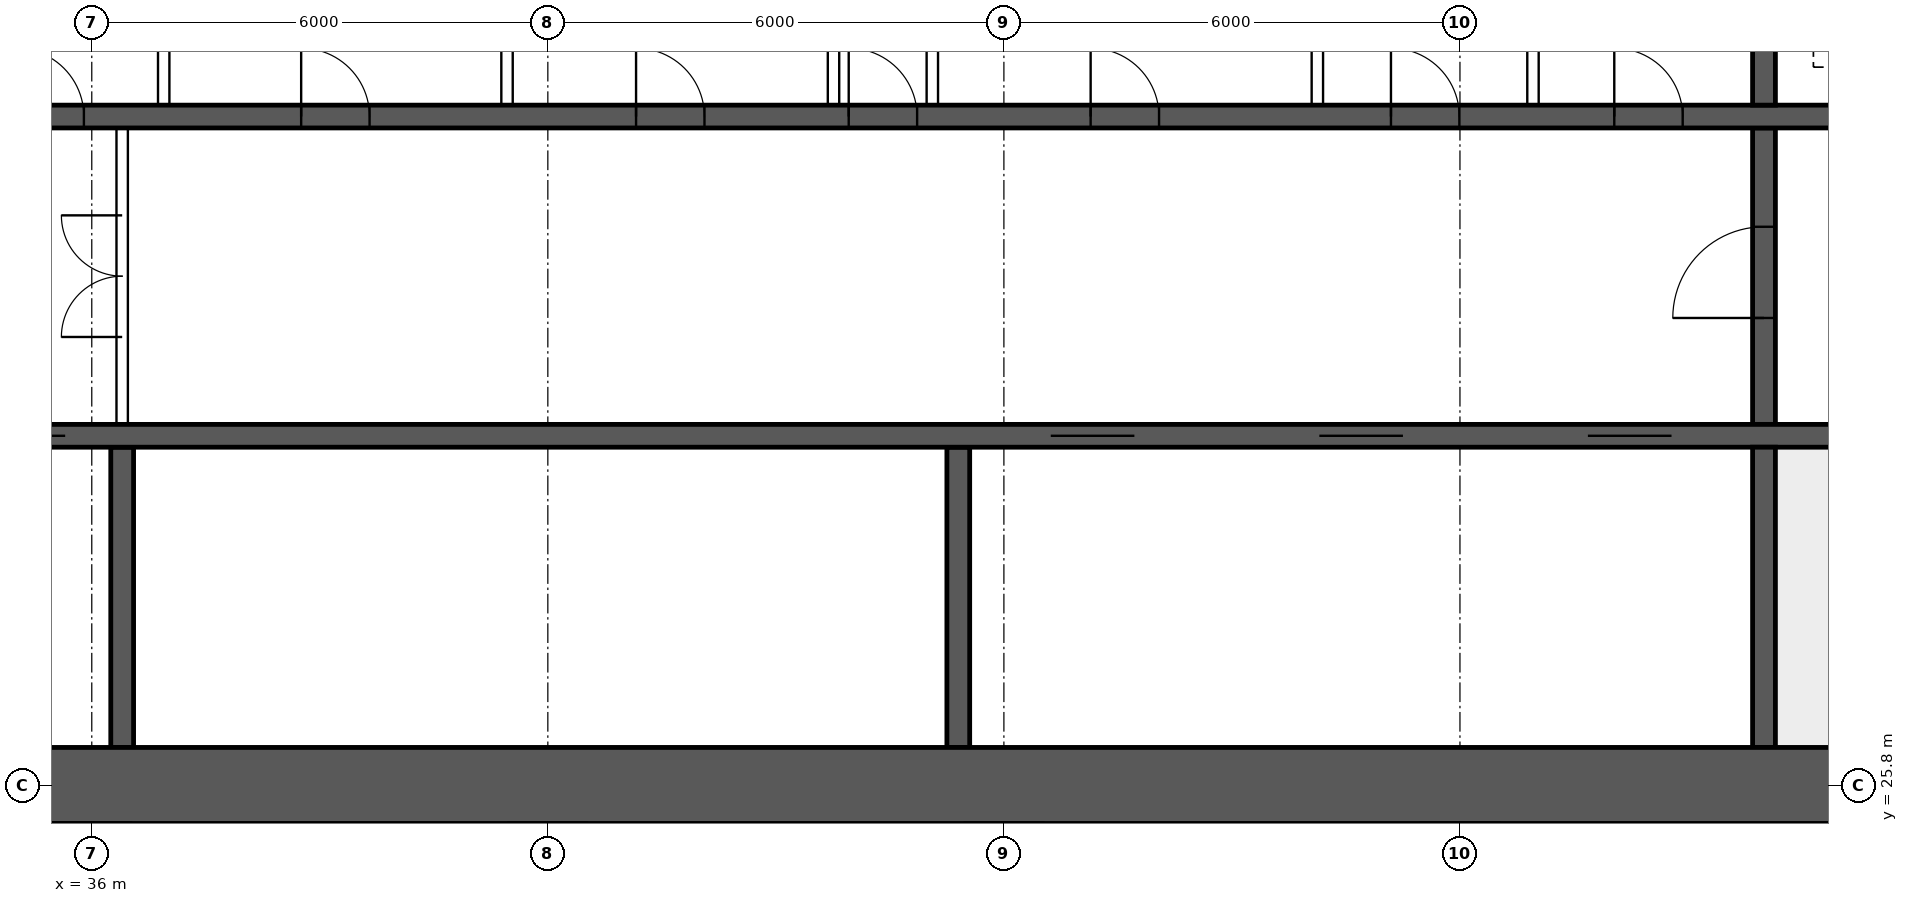
"""IFC4 building model, lengths in metres.
Left out: names, types, materials, properties, quantities, classifications, styles, units other than length and angle.
Written with IfcOpenShell. Run it as: python <this file> out.ifc"""

import sys

from ifc_helpers import new_model, si_unit, direction, frame, frame_2d, origin, place, context, subcontext, project, spatial, rectangle, extrude, element, fill, save


model = new_model("IFC4")
c1 = context("Model", 3, precision=1e-05, world=origin(), true_north=direction((0.0, 1.0)))
c2 = subcontext(c1, "Body", "Model", "MODEL_VIEW")
j1 = project(units=[si_unit("LENGTHUNIT", "METRE"), si_unit("PLANEANGLEUNIT", "RADIAN")], contexts=[c1])
p1 = place(None, origin())
s1 = spatial("IfcSite", under=j1, at=p1, CompositionType="ELEMENT")
p2 = place(p1, origin())
s2 = spatial("IfcBuilding", under=s1, at=p2, CompositionType="ELEMENT")
p3 = place(p2, frame((0.0, 0.0, 46.45)))
s3 = spatial("IfcBuildingStorey", under=s2, at=p3, CompositionType="ELEMENT", Elevation=46.45)
p4 = place(p3, frame((18.0, 25.8, 0.0), z_axis=(0.0, 0.0, 1.0), x_axis=(1.0, 0.0, 0.0)))
e1 = element("IfcWall", 1, at=p4, inside=s3, PredefinedType="SHEAR", context=c2, shape_type="SweptSolid", body=[
    extrude(rectangle(XDim=48.0, YDim=1.0, at=frame_2d((24.0, 0.0))), origin(), (0.0, 0.0, 1.0), 3.75),
])
p5 = place(p3, frame((18.5, 30.4, 0.0), z_axis=(0.0, 0.0, 1.0), x_axis=(1.0, 0.0, 0.0)))
e2 = element("IfcWall", 2, at=p5, inside=s3, PredefinedType="SHEAR", context=c2, shape_type="SweptSolid", body=[
    extrude(rectangle(XDim=47.0, YDim=0.3, at=frame_2d((23.5, 0.0))), origin(), (0.0, 0.0, 1.0), 3.75),
])
p6 = place(p5, frame((0.4, 0.0, 0.0)))
e3 = element("IfcOpeningElement", 3, at=p6, cuts=e2, PredefinedType="OPENING", context=c2, shape_type="SweptSolid", body=[
    extrude(rectangle(XDim=1.0, YDim=2.1, at=frame_2d((0.5, 1.05))), frame((0.0, 0.16, 0.0), z_axis=(0.0, -1.0, 0.0), x_axis=(1.0, 0.0, 0.0)), (0.0, 0.0, 1.0), 0.32),
])
p7 = place(p5, frame((45.6, 0.0, 0.0)))
e4 = element("IfcOpeningElement", 4, at=p7, cuts=e2, PredefinedType="OPENING", context=c2, shape_type="SweptSolid", body=[
    extrude(rectangle(XDim=1.0, YDim=2.1, at=frame_2d((0.5, 1.05))), frame((0.0, 0.16, 0.0), z_axis=(0.0, -1.0, 0.0), x_axis=(1.0, 0.0, 0.0)), (0.0, 0.0, 1.0), 0.32),
])
p8 = place(p5, frame((8.25, 0.0, 0.0)))
e5 = element("IfcOpeningElement", 5, at=p8, cuts=e2, PredefinedType="OPENING", context=c2, shape_type="SweptSolid", body=[
    extrude(rectangle(XDim=1.1, YDim=2.1, at=frame_2d((0.55, 1.05))), frame((0.0, 0.16, 0.0), z_axis=(0.0, -1.0, 0.0), x_axis=(1.0, 0.0, 0.0)), (0.0, 0.0, 1.0), 0.32),
])
p9 = place(p5, frame((10.85, 0.0, 0.0)))
e6 = element("IfcOpeningElement", 6, at=p9, cuts=e2, PredefinedType="OPENING", context=c2, shape_type="SweptSolid", body=[
    extrude(rectangle(XDim=1.1, YDim=2.1, at=frame_2d((0.55, 1.05))), frame((0.0, 0.16, 0.0), z_axis=(0.0, -1.0, 0.0), x_axis=(1.0, 0.0, 0.0)), (0.0, 0.0, 1.0), 0.32),
])
p10 = place(p5, frame((13.45, 0.0, 0.0)))
e7 = element("IfcOpeningElement", 7, at=p10, cuts=e2, PredefinedType="OPENING", context=c2, shape_type="SweptSolid", body=[
    extrude(rectangle(XDim=1.1, YDim=2.1, at=frame_2d((0.55, 1.05))), frame((0.0, 0.16, 0.0), z_axis=(0.0, -1.0, 0.0), x_axis=(1.0, 0.0, 0.0)), (0.0, 0.0, 1.0), 0.32),
])
p11 = place(p5, frame((16.05, 0.0, 0.0)))
e8 = element("IfcOpeningElement", 8, at=p11, cuts=e2, PredefinedType="OPENING", context=c2, shape_type="SweptSolid", body=[
    extrude(rectangle(XDim=1.1, YDim=2.1, at=frame_2d((0.55, 1.05))), frame((0.0, 0.16, 0.0), z_axis=(0.0, -1.0, 0.0), x_axis=(1.0, 0.0, 0.0)), (0.0, 0.0, 1.0), 0.32),
])
p12 = place(p5, frame((30.117, 0.0, 0.0)))
e9 = element("IfcOpeningElement", 9, at=p12, cuts=e2, PredefinedType="OPENING", context=c2, shape_type="SweptSolid", body=[
    extrude(rectangle(XDim=1.1, YDim=2.1, at=frame_2d((0.55, 1.05))), frame((0.0, 0.16, 0.0), z_axis=(0.0, -1.0, 0.0), x_axis=(1.0, 0.0, 0.0)), (0.0, 0.0, 1.0), 0.32),
])
p13 = place(p5, frame((33.65, 0.0, 0.0)))
e10 = element("IfcOpeningElement", 10, at=p13, cuts=e2, PredefinedType="OPENING", context=c2, shape_type="SweptSolid", body=[
    extrude(rectangle(XDim=1.1, YDim=2.1, at=frame_2d((0.55, 1.05))), frame((0.0, 0.16, 0.0), z_axis=(0.0, -1.0, 0.0), x_axis=(1.0, 0.0, 0.0)), (0.0, 0.0, 1.0), 0.32),
])
p14 = place(p5, frame((37.183, 0.0, 0.0)))
e11 = element("IfcOpeningElement", 11, at=p14, cuts=e2, PredefinedType="OPENING", context=c2, shape_type="SweptSolid", body=[
    extrude(rectangle(XDim=1.1, YDim=2.1, at=frame_2d((0.55, 1.05))), frame((0.0, 0.16, 0.0), z_axis=(0.0, -1.0, 0.0), x_axis=(1.0, 0.0, 0.0)), (0.0, 0.0, 1.0), 0.32),
])
p15 = place(p3, frame((18.5, 34.6, 0.0), z_axis=(0.0, 0.0, 1.0), x_axis=(1.0, 0.0, 0.0)))
e12 = element("IfcWall", 12, at=p15, inside=s3, PredefinedType="SHEAR", context=c2, shape_type="SweptSolid", body=[
    extrude(rectangle(XDim=47.0, YDim=0.3, at=frame_2d((23.5, 0.0))), origin(), (0.0, 0.0, 1.0), 3.75),
])
p16 = place(p15, frame((0.9, 0.0, 0.0)))
e13 = element("IfcOpeningElement", 13, at=p16, cuts=e12, PredefinedType="OPENING", context=c2, shape_type="SweptSolid", body=[
    extrude(rectangle(XDim=1.1, YDim=2.1, at=frame_2d((0.55, 1.05))), frame((0.0, 0.16, 0.0), z_axis=(0.0, -1.0, 0.0), x_axis=(1.0, 0.0, 0.0)), (0.0, 0.0, 1.0), 0.32),
])
p17 = place(p15, frame((45.0, 0.0, 0.0)))
e14 = element("IfcOpeningElement", 14, at=p17, cuts=e12, PredefinedType="OPENING", context=c2, shape_type="SweptSolid", body=[
    extrude(rectangle(XDim=1.1, YDim=2.1, at=frame_2d((0.55, 1.05))), frame((0.0, 0.16, 0.0), z_axis=(0.0, -1.0, 0.0), x_axis=(1.0, 0.0, 0.0)), (0.0, 0.0, 1.0), 0.32),
])
p18 = place(p15, frame((4.1, 0.0, 0.0)))
e15 = element("IfcOpeningElement", 15, at=p18, cuts=e12, PredefinedType="OPENING", context=c2, shape_type="SweptSolid", body=[
    extrude(rectangle(XDim=0.9, YDim=2.1, at=frame_2d((0.45, 1.05))), frame((0.0, 0.16, 0.0), z_axis=(0.0, -1.0, 0.0), x_axis=(1.0, 0.0, 0.0)), (0.0, 0.0, 1.0), 0.32),
])
p19 = place(p15, frame((42.0, 0.0, 0.0)))
e16 = element("IfcOpeningElement", 16, at=p19, cuts=e12, PredefinedType="OPENING", context=c2, shape_type="SweptSolid", body=[
    extrude(rectangle(XDim=0.9, YDim=2.1, at=frame_2d((0.45, 1.05))), frame((0.0, 0.16, 0.0), z_axis=(0.0, -1.0, 0.0), x_axis=(1.0, 0.0, 0.0)), (0.0, 0.0, 1.0), 0.32),
])
p20 = place(p15, frame((8.875, 0.0, 0.0)))
e17 = element("IfcOpeningElement", 17, at=p20, cuts=e12, PredefinedType="OPENING", context=c2, shape_type="SweptSolid", body=[
    extrude(rectangle(XDim=0.9, YDim=2.1, at=frame_2d((0.45, 1.05))), frame((0.0, 0.16, 0.0), z_axis=(0.0, -1.0, 0.0), x_axis=(1.0, 0.0, 0.0)), (0.0, 0.0, 1.0), 0.32),
])
p21 = place(p15, frame((12.849, 0.0, 0.0)))
e18 = element("IfcOpeningElement", 18, at=p21, cuts=e12, PredefinedType="OPENING", context=c2, shape_type="SweptSolid", body=[
    extrude(rectangle(XDim=0.9, YDim=2.1, at=frame_2d((0.45, 1.05))), frame((0.0, 0.16, 0.0), z_axis=(0.0, -1.0, 0.0), x_axis=(1.0, 0.0, 0.0)), (0.0, 0.0, 1.0), 0.32),
])
p22 = place(p15, frame((16.496, 0.0, 0.0)))
e19 = element("IfcOpeningElement", 19, at=p22, cuts=e12, PredefinedType="OPENING", context=c2, shape_type="SweptSolid", body=[
    extrude(rectangle(XDim=0.9, YDim=2.1, at=frame_2d((0.45, 1.05))), frame((0.0, 0.16, 0.0), z_axis=(0.0, -1.0, 0.0), x_axis=(1.0, 0.0, 0.0)), (0.0, 0.0, 1.0), 0.32),
])
p23 = place(p15, frame((20.255, 0.0, 0.0)))
e20 = element("IfcOpeningElement", 20, at=p23, cuts=e12, PredefinedType="OPENING", context=c2, shape_type="SweptSolid", body=[
    extrude(rectangle(XDim=0.9, YDim=2.1, at=frame_2d((0.45, 1.05))), frame((0.0, 0.16, 0.0), z_axis=(0.0, -1.0, 0.0), x_axis=(1.0, 0.0, 0.0)), (0.0, 0.0, 1.0), 0.32),
])
p24 = place(p15, frame((24.661, 0.0, 0.0)))
e21 = element("IfcOpeningElement", 21, at=p24, cuts=e12, PredefinedType="OPENING", context=c2, shape_type="SweptSolid", body=[
    extrude(rectangle(XDim=0.9, YDim=2.1, at=frame_2d((0.45, 1.05))), frame((0.0, 0.16, 0.0), z_axis=(0.0, -1.0, 0.0), x_axis=(1.0, 0.0, 0.0)), (0.0, 0.0, 1.0), 0.32),
])
p25 = place(p15, frame((27.458, 0.0, 0.0)))
e22 = element("IfcOpeningElement", 22, at=p25, cuts=e12, PredefinedType="OPENING", context=c2, shape_type="SweptSolid", body=[
    extrude(rectangle(XDim=0.9, YDim=2.1, at=frame_2d((0.45, 1.05))), frame((0.0, 0.16, 0.0), z_axis=(0.0, -1.0, 0.0), x_axis=(1.0, 0.0, 0.0)), (0.0, 0.0, 1.0), 0.32),
])
p26 = place(p15, frame((30.641, 0.0, 0.0)))
e23 = element("IfcOpeningElement", 23, at=p26, cuts=e12, PredefinedType="OPENING", context=c2, shape_type="SweptSolid", body=[
    extrude(rectangle(XDim=0.9, YDim=2.1, at=frame_2d((0.45, 1.05))), frame((0.0, 0.16, 0.0), z_axis=(0.0, -1.0, 0.0), x_axis=(1.0, 0.0, 0.0)), (0.0, 0.0, 1.0), 0.32),
])
p27 = place(p15, frame((34.592, 0.0, 0.0)))
e24 = element("IfcOpeningElement", 24, at=p27, cuts=e12, PredefinedType="OPENING", context=c2, shape_type="SweptSolid", body=[
    extrude(rectangle(XDim=0.9, YDim=2.1, at=frame_2d((0.45, 1.05))), frame((0.0, 0.16, 0.0), z_axis=(0.0, -1.0, 0.0), x_axis=(1.0, 0.0, 0.0)), (0.0, 0.0, 1.0), 0.32),
])
p28 = place(p15, frame((37.53, 0.0, 0.0)))
e25 = element("IfcOpeningElement", 25, at=p28, cuts=e12, PredefinedType="OPENING", context=c2, shape_type="SweptSolid", body=[
    extrude(rectangle(XDim=0.9, YDim=2.1, at=frame_2d((0.45, 1.05))), frame((0.0, 0.16, 0.0), z_axis=(0.0, -1.0, 0.0), x_axis=(1.0, 0.0, 0.0)), (0.0, 0.0, 1.0), 0.32),
])
p29 = place(p3, frame((58.0, 26.3, 0.0), z_axis=(0.0, 0.0, 1.0), x_axis=(0.0, 1.0, 0.0)))
e26 = element("IfcWall", 26, at=p29, inside=s3, PredefinedType="SHEAR", context=c2, shape_type="SweptSolid", body=[
    extrude(rectangle(XDim=3.95, YDim=0.3, at=frame_2d((1.975, 0.0))), origin(), (0.0, 0.0, 1.0), 3.75),
])
p30 = place(p3, frame((58.0, 30.55, 0.0), z_axis=(0.0, 0.0, 1.0), x_axis=(0.0, 1.0, 0.0)))
e27 = element("IfcWall", 27, at=p30, inside=s3, PredefinedType="SHEAR", context=c2, shape_type="SweptSolid", body=[
    extrude(rectangle(XDim=3.9, YDim=0.3, at=frame_2d((1.95, 0.0))), origin(), (0.0, 0.0, 1.0), 3.75),
])
p31 = place(p30, frame((1.4, 0.0, 0.0)))
e28 = element("IfcOpeningElement", 28, at=p31, cuts=e27, PredefinedType="OPENING", context=c2, shape_type="SweptSolid", body=[
    extrude(rectangle(XDim=1.2, YDim=2.1, at=frame_2d((0.6, 1.05))), frame((0.0, 0.16, 0.0), z_axis=(0.0, -1.0, 0.0), x_axis=(1.0, 0.0, 0.0)), (0.0, 0.0, 1.0), 0.32),
])
p32 = place(p3, frame((58.0, 34.75, 0.0), z_axis=(0.0, 0.0, 1.0), x_axis=(0.0, 1.0, 0.0)))
e29 = element("IfcWall", 29, at=p32, inside=s3, PredefinedType="SHEAR", context=c2, shape_type="SweptSolid", body=[
    extrude(rectangle(XDim=2.95, YDim=0.3, at=frame_2d((1.475, 0.0))), origin(), (0.0, 0.0, 1.0), 3.75),
])
for number, where, z_axis, x_axis in (
    (30, (36.4, 26.3, 0.0), (0.0, 0.0, 1.0), (0.0, 1.0, 0.0)),
    (31, (47.4, 26.3, 0.0), (0.0, 0.0, 1.0), (0.0, 1.0, 0.0)),
):
    element("IfcWall", number, at=place(p3, frame(where, z_axis=z_axis, x_axis=x_axis)), inside=s3, PredefinedType="SHEAR", context=c2, shape_type="SweptSolid", body=[
        extrude(rectangle(XDim=3.95, YDim=0.3, at=frame_2d((1.975, 0.0))), origin(), (0.0, 0.0, 1.0), 3.75),
    ])
p33 = place(p3, frame((36.4, 30.55, 0.0), z_axis=(0.0, 0.0, 1.0), x_axis=(0.0, 1.0, 0.0)))
e32 = element("IfcWall", 32, at=p33, inside=s3, PredefinedType="SOLIDWALL", context=c2, shape_type="SweptSolid", body=[
    extrude(rectangle(XDim=3.9, YDim=0.15, at=frame_2d((1.95, 0.0))), origin(), (0.0, 0.0, 1.0), 3.5),
])
p34 = place(p33, frame((1.15, 0.0, 0.0)))
e33 = element("IfcOpeningElement", 33, at=p34, cuts=e32, PredefinedType="OPENING", context=c2, shape_type="SweptSolid", body=[
    extrude(rectangle(XDim=1.6, YDim=2.1, at=frame_2d((0.8, 1.05))), frame((0.0, 0.085, 0.0), z_axis=(0.0, -1.0, 0.0), x_axis=(1.0, 0.0, 0.0)), (0.0, 0.0, 1.0), 0.17),
])
for number, where, z_axis, x_axis in (
    (34, (36.946, 34.75, 0.0), (0.0, 0.0, 1.0), (0.0, 1.0, 0.0)),
    (35, (41.463, 34.75, 0.0), (0.0, 0.0, 1.0), (0.0, 1.0, 0.0)),
    (36, (45.758, 34.75, 0.0), (0.0, 0.0, 1.0), (0.0, 1.0, 0.0)),
    (37, (47.058, 34.75, 0.0), (0.0, 0.0, 1.0), (0.0, 1.0, 0.0)),
    (38, (52.124, 34.75, 0.0), (0.0, 0.0, 1.0), (0.0, 1.0, 0.0)),
    (39, (54.961, 34.75, 0.0), (0.0, 0.0, 1.0), (0.0, 1.0, 0.0)),
):
    element("IfcWall", number, at=place(p3, frame(where, z_axis=z_axis, x_axis=x_axis)), inside=s3, PredefinedType="SOLIDWALL", context=c2, shape_type="SweptSolid", body=[
        extrude(rectangle(XDim=2.95, YDim=0.15, at=frame_2d((1.475, 0.0))), origin(), (0.0, 0.0, 1.0), 3.5),
    ])
for number, where, z_axis, x_axis in (
    (40, (39.31, 14.9, 0.0), (0.0, 0.0, 1.0), (0.0, 1.0, 0.0)),
    (41, (45.48, 14.9, 0.0), (0.0, 0.0, 1.0), (0.0, 1.0, 0.0)),
):
    element("IfcWall", number, at=place(p3, frame(where, z_axis=z_axis, x_axis=x_axis)), inside=s3, PredefinedType="PARTITIONING", context=c2, shape_type="SweptSolid", body=[
        extrude(rectangle(XDim=10.4, YDim=0.15, at=frame_2d((5.2, 0.0))), origin(), (0.0, 0.0, 1.0), 3.5),
    ])
p35 = place(p34, origin())
e42 = element("IfcDoor", 42, at=p35, inside=s3, OperationType="DOUBLE_DOOR_SINGLE_SWING", PredefinedType="DOOR", context=c2, shape_type="SweptSolid", body=[
    extrude(rectangle(XDim=1.6, YDim=2.1, at=frame_2d((0.8, 1.05))), frame((0.0, 0.025, 0.0), z_axis=(0.0, -1.0, 0.0), x_axis=(1.0, 0.0, 0.0)), (0.0, 0.0, 1.0), 0.05),
])
fill(e33, e42)
p36 = place(p31, origin())
e43 = element("IfcDoor", 43, at=p36, inside=s3, OperationType="SINGLE_SWING_LEFT", PredefinedType="DOOR", context=c2, shape_type="SweptSolid", body=[
    extrude(rectangle(XDim=1.2, YDim=2.1, at=frame_2d((0.6, 1.05))), frame((0.0, 0.025, 0.0), z_axis=(0.0, -1.0, 0.0), x_axis=(1.0, 0.0, 0.0)), (0.0, 0.0, 1.0), 0.05),
])
fill(e28, e43)
p37 = place(p22, origin())
e44 = element("IfcDoor", 44, at=p37, inside=s3, OperationType="SINGLE_SWING_LEFT", PredefinedType="DOOR", context=c2, shape_type="SweptSolid", body=[
    extrude(rectangle(XDim=0.9, YDim=2.1, at=frame_2d((0.45, 1.05))), frame((0.0, 0.025, 0.0), z_axis=(0.0, -1.0, 0.0), x_axis=(1.0, 0.0, 0.0)), (0.0, 0.0, 1.0), 0.05),
])
fill(e19, e44)
p38 = place(p23, origin())
e45 = element("IfcDoor", 45, at=p38, inside=s3, OperationType="SINGLE_SWING_LEFT", PredefinedType="DOOR", context=c2, shape_type="SweptSolid", body=[
    extrude(rectangle(XDim=0.9, YDim=2.1, at=frame_2d((0.45, 1.05))), frame((0.0, 0.025, 0.0), z_axis=(0.0, -1.0, 0.0), x_axis=(1.0, 0.0, 0.0)), (0.0, 0.0, 1.0), 0.05),
])
fill(e20, e45)
p39 = place(p24, origin())
e46 = element("IfcDoor", 46, at=p39, inside=s3, OperationType="SINGLE_SWING_LEFT", PredefinedType="DOOR", context=c2, shape_type="SweptSolid", body=[
    extrude(rectangle(XDim=0.9, YDim=2.1, at=frame_2d((0.45, 1.05))), frame((0.0, 0.025, 0.0), z_axis=(0.0, -1.0, 0.0), x_axis=(1.0, 0.0, 0.0)), (0.0, 0.0, 1.0), 0.05),
])
fill(e21, e46)
p40 = place(p25, origin())
e47 = element("IfcDoor", 47, at=p40, inside=s3, OperationType="SINGLE_SWING_LEFT", PredefinedType="DOOR", context=c2, shape_type="SweptSolid", body=[
    extrude(rectangle(XDim=0.9, YDim=2.1, at=frame_2d((0.45, 1.05))), frame((0.0, 0.025, 0.0), z_axis=(0.0, -1.0, 0.0), x_axis=(1.0, 0.0, 0.0)), (0.0, 0.0, 1.0), 0.05),
])
fill(e22, e47)
p41 = place(p26, origin())
e48 = element("IfcDoor", 48, at=p41, inside=s3, OperationType="SINGLE_SWING_LEFT", PredefinedType="DOOR", context=c2, shape_type="SweptSolid", body=[
    extrude(rectangle(XDim=0.9, YDim=2.1, at=frame_2d((0.45, 1.05))), frame((0.0, 0.025, 0.0), z_axis=(0.0, -1.0, 0.0), x_axis=(1.0, 0.0, 0.0)), (0.0, 0.0, 1.0), 0.05),
])
fill(e23, e48)
p42 = place(p27, origin())
e49 = element("IfcDoor", 49, at=p42, inside=s3, OperationType="SINGLE_SWING_LEFT", PredefinedType="DOOR", context=c2, shape_type="SweptSolid", body=[
    extrude(rectangle(XDim=0.9, YDim=2.1, at=frame_2d((0.45, 1.05))), frame((0.0, 0.025, 0.0), z_axis=(0.0, -1.0, 0.0), x_axis=(1.0, 0.0, 0.0)), (0.0, 0.0, 1.0), 0.05),
])
fill(e24, e49)
p43 = place(p28, origin())
e50 = element("IfcDoor", 50, at=p43, inside=s3, OperationType="SINGLE_SWING_LEFT", PredefinedType="DOOR", context=c2, shape_type="SweptSolid", body=[
    extrude(rectangle(XDim=0.9, YDim=2.1, at=frame_2d((0.45, 1.05))), frame((0.0, 0.025, 0.0), z_axis=(0.0, -1.0, 0.0), x_axis=(1.0, 0.0, 0.0)), (0.0, 0.0, 1.0), 0.05),
])
fill(e25, e50)
p44 = place(p11, origin())
e51 = element("IfcDoor", 51, at=p44, inside=s3, OperationType="DOUBLE_DOOR_SLIDING", PredefinedType="DOOR", context=c2, shape_type="SweptSolid", body=[
    extrude(rectangle(XDim=1.1, YDim=2.1, at=frame_2d((0.55, 1.05))), frame((0.0, 0.025, 0.0), z_axis=(0.0, -1.0, 0.0), x_axis=(1.0, 0.0, 0.0)), (0.0, 0.0, 1.0), 0.05),
])
fill(e8, e51)
p45 = place(p12, origin())
e52 = element("IfcDoor", 52, at=p45, inside=s3, OperationType="DOUBLE_DOOR_SLIDING", PredefinedType="DOOR", context=c2, shape_type="SweptSolid", body=[
    extrude(rectangle(XDim=1.1, YDim=2.1, at=frame_2d((0.55, 1.05))), frame((0.0, 0.025, 0.0), z_axis=(0.0, -1.0, 0.0), x_axis=(1.0, 0.0, 0.0)), (0.0, 0.0, 1.0), 0.05),
])
fill(e9, e52)
p46 = place(p13, origin())
e53 = element("IfcDoor", 53, at=p46, inside=s3, OperationType="DOUBLE_DOOR_SLIDING", PredefinedType="DOOR", context=c2, shape_type="SweptSolid", body=[
    extrude(rectangle(XDim=1.1, YDim=2.1, at=frame_2d((0.55, 1.05))), frame((0.0, 0.025, 0.0), z_axis=(0.0, -1.0, 0.0), x_axis=(1.0, 0.0, 0.0)), (0.0, 0.0, 1.0), 0.05),
])
fill(e10, e53)
p47 = place(p14, origin())
e54 = element("IfcDoor", 54, at=p47, inside=s3, OperationType="DOUBLE_DOOR_SLIDING", PredefinedType="DOOR", context=c2, shape_type="SweptSolid", body=[
    extrude(rectangle(XDim=1.1, YDim=2.1, at=frame_2d((0.55, 1.05))), frame((0.0, 0.025, 0.0), z_axis=(0.0, -1.0, 0.0), x_axis=(1.0, 0.0, 0.0)), (0.0, 0.0, 1.0), 0.05),
])
fill(e11, e54)
save(model, sys.argv[1])
